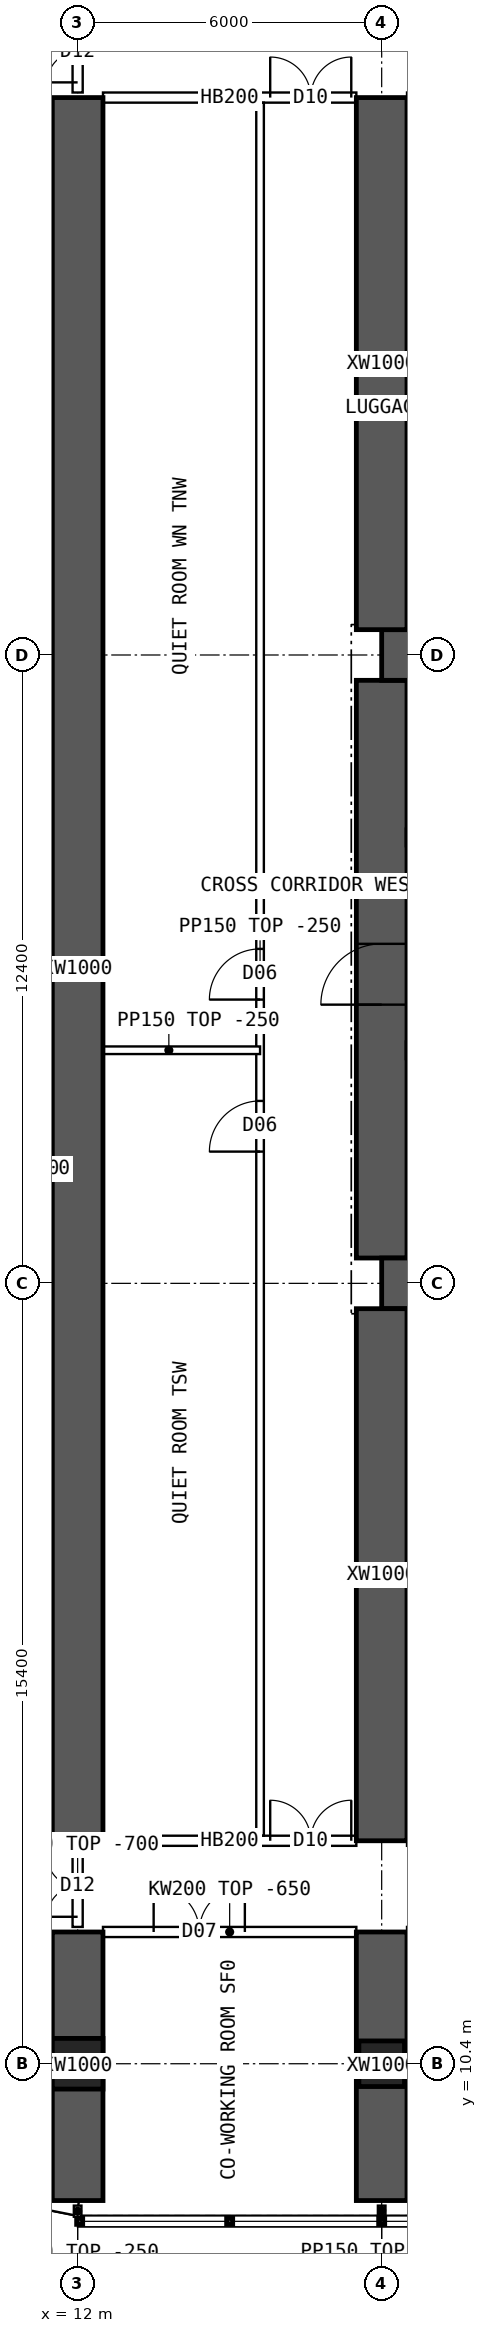
"""IFC4 building model, lengths in metres.
Left out: names, types, materials, properties, quantities, classifications, styles, units other than length and angle.
Written with IfcOpenShell. Run it as: python <this file> out.ifc"""

import sys

from ifc_helpers import new_model, si_unit, direction, frame, frame_2d, origin, origin_2d, place, context, subcontext, project, spatial, polyline, rectangle, hollow_rectangle, outline, extrude, element, fill, save


model = new_model("IFC4")
c1 = context("Model", 3, precision=1e-05, world=origin(), true_north=direction((0.0, 1.0)))
c2 = subcontext(c1, "Body", "Model", "MODEL_VIEW")
j1 = project(units=[si_unit("LENGTHUNIT", "METRE"), si_unit("PLANEANGLEUNIT", "RADIAN")], contexts=[c1])
p1 = place(None, origin())
s1 = spatial("IfcSite", under=j1, at=p1, CompositionType="ELEMENT")
p2 = place(p1, origin())
s2 = spatial("IfcBuilding", under=s1, at=p2, CompositionType="ELEMENT")
p3 = place(p2, frame((0.0, 0.0, 16.0)))
s3 = spatial("IfcBuildingStorey", under=s2, at=p3, CompositionType="ELEMENT", Elevation=16.0)
p4 = place(p3, frame((12.0, 10.4, 0.0), z_axis=(0.0, 0.0, 1.0), x_axis=(1.0, 0.0, 0.0)))
e1 = element("IfcColumn", 1, at=p4, inside=s3, PredefinedType="COLUMN", context=c2, shape_type="SweptSolid", body=[
    extrude(hollow_rectangle(XDim=1.0, YDim=1.0, WallThickness=0.1, at=origin_2d()), origin(), (0.0, 0.0, 1.0), 4.2),
])
p5 = place(p3, frame((18.0, 10.4, 0.0), z_axis=(0.0, 0.0, 1.0), x_axis=(1.0, 0.0, 0.0)))
e2 = element("IfcColumn", 2, at=p5, inside=s3, PredefinedType="COLUMN", context=c2, shape_type="SweptSolid", body=[
    extrude(hollow_rectangle(XDim=0.9, YDim=0.9, WallThickness=0.09, at=origin_2d()), origin(), (0.0, 0.0, 1.0), 4.2),
])
for number, where, z_axis, x_axis in (
    (3, (18.0, 25.8, 0.0), (0.0, 0.0, 1.0), (1.0, 0.0, 0.0)),
    (4, (18.0, 38.2, 0.0), (0.0, 0.0, 1.0), (1.0, 0.0, 0.0)),
):
    element("IfcWall", number, at=place(p3, frame(where, z_axis=z_axis, x_axis=x_axis)), inside=s3, PredefinedType="SHEAR", context=c2, shape_type="SweptSolid", body=[
        extrude(rectangle(XDim=48.0, YDim=1.0, at=frame_2d((24.0, 0.0))), origin(), (0.0, 0.0, 1.0), 4.2),
    ])
p6 = place(p3, frame((18.0, 26.3, 0.0), z_axis=(0.0, 0.0, 1.0), x_axis=(0.0, 1.0, 0.0)))
e5 = element("IfcWall", 5, at=p6, inside=s3, PredefinedType="SHEAR", context=c2, shape_type="SweptSolid", body=[
    extrude(rectangle(XDim=11.4, YDim=1.0, at=frame_2d((5.7, 0.0))), origin(), (0.0, 0.0, 1.0), 4.2),
])
p7 = place(p6, frame((5.0, 0.0, 0.0)))
e6 = element("IfcOpeningElement", 6, at=p7, cuts=e5, PredefinedType="OPENING", context=c2, shape_type="SweptSolid", body=[
    extrude(rectangle(XDim=1.2, YDim=2.1, at=frame_2d((0.6, 1.05))), frame((0.0, 0.51, 0.0), z_axis=(0.0, -1.0, 0.0), x_axis=(1.0, 0.0, 0.0)), (0.0, 0.0, 1.0), 1.02),
])
p8 = place(p3, frame((12.0, 7.7, 0.0), z_axis=(0.0, 0.0, 1.0), x_axis=(0.0, 1.0, 0.0)))
e7 = element("IfcWall", 7, at=p8, inside=s3, PredefinedType="SHEAR", context=c2, shape_type="SweptSolid", body=[
    extrude(rectangle(XDim=5.3, YDim=1.0, at=frame_2d((2.65, 0.0))), origin(), (0.0, 0.0, 1.0), 4.2),
])
p9 = place(p3, frame((12.0, 14.8, 0.0), z_axis=(0.0, 0.0, 1.0), x_axis=(0.0, 1.0, 0.0)))
e8 = element("IfcWall", 8, at=p9, inside=s3, PredefinedType="SHEAR", context=c2, shape_type="SweptSolid", body=[
    extrude(rectangle(XDim=34.4, YDim=1.0, at=frame_2d((17.2, 0.0))), origin(), (0.0, 0.0, 1.0), 4.2),
])
p10 = place(p3, frame((18.0, 7.7, 0.0), z_axis=(0.0, 0.0, 1.0), x_axis=(0.0, 1.0, 0.0)))
e9 = element("IfcWall", 9, at=p10, inside=s3, PredefinedType="SHEAR", context=c2, shape_type="SweptSolid", body=[
    extrude(rectangle(XDim=5.3, YDim=1.0, at=frame_2d((2.65, 0.0))), origin(), (0.0, 0.0, 1.0), 4.2),
])
for number, where, z_axis, x_axis in (
    (10, (18.0, 14.8, 0.0), (0.0, 0.0, 1.0), (0.0, 1.0, 0.0)),
    (11, (18.0, 38.7, 0.0), (0.0, 0.0, 1.0), (0.0, 1.0, 0.0)),
):
    element("IfcWall", number, at=place(p3, frame(where, z_axis=z_axis, x_axis=x_axis)), inside=s3, PredefinedType="SHEAR", context=c2, shape_type="SweptSolid", body=[
        extrude(rectangle(XDim=10.5, YDim=1.0, at=frame_2d((5.25, 0.0))), origin(), (0.0, 0.0, 1.0), 4.2),
    ])
p11 = place(p3, frame((8.843, 8.178, 0.0), z_axis=(0.0, 0.0, 1.0), x_axis=(0.980787251524, -0.195080412259, 0.0)))
e12 = element("IfcWall", 12, at=p11, inside=s3, PredefinedType="SOLIDWALL", context=c2, shape_type="SweptSolid", body=[
    extrude(outline(polyline([(-0.03, -0.15), (3.249, -0.15), (3.189, 0.15), (0.03, 0.15), (-0.03, -0.15)])), origin(), (0.0, 0.0, 1.0), 3.95),
])
p12 = place(p11, frame((0.909, 0.0, 0.9)))
e13 = element("IfcOpeningElement", 13, at=p12, cuts=e12, PredefinedType="OPENING", context=c2, shape_type="SweptSolid", body=[
    extrude(rectangle(XDim=1.4, YDim=1.8, at=frame_2d((0.7, 0.9))), frame((0.0, 0.16, 0.0), z_axis=(0.0, -1.0, 0.0), x_axis=(1.0, 0.0, 0.0)), (0.0, 0.0, 1.0), 0.32),
])
p13 = place(p3, frame((12.5, 13.0, 0.0), z_axis=(0.0, 0.0, 1.0), x_axis=(1.0, 0.0, 0.0)))
e14 = element("IfcWall", 14, at=p13, inside=s3, PredefinedType="SOLIDWALL", context=c2, shape_type="SweptSolid", body=[
    extrude(outline(polyline([(0.0, 0.0), (5.0, 0.0), (5.0, 3.55), (0.0, 3.55), (0.0, 0.0)])), frame((0.0, 0.1, 0.0), z_axis=(0.0, -1.0, 0.0), x_axis=(1.0, 0.0, 0.0)), (0.0, 0.0, 1.0), 0.2),
])
p14 = place(p13, frame((1.0, 0.0, 0.0)))
e15 = element("IfcOpeningElement", 15, at=p14, cuts=e14, PredefinedType="OPENING", context=c2, shape_type="SweptSolid", body=[
    extrude(rectangle(XDim=1.8, YDim=2.1, at=frame_2d((0.9, 1.05))), frame((0.0, 0.11, 0.0), z_axis=(0.0, -1.0, 0.0), x_axis=(1.0, 0.0, 0.0)), (0.0, 0.0, 1.0), 0.22),
])
p15 = place(p3, frame((12.5, 14.8, 0.0), z_axis=(0.0, 0.0, 1.0), x_axis=(1.0, 0.0, 0.0)))
e16 = element("IfcWall", 16, at=p15, inside=s3, PredefinedType="SOLIDWALL", context=c2, shape_type="SweptSolid", body=[
    extrude(rectangle(XDim=5.0, YDim=0.2, at=frame_2d((2.5, 0.0))), origin(), (0.0, 0.0, 1.0), 3.95),
])
p16 = place(p15, frame((3.3, 0.0, 0.0)))
e17 = element("IfcOpeningElement", 17, at=p16, cuts=e16, PredefinedType="OPENING", context=c2, shape_type="SweptSolid", body=[
    extrude(rectangle(XDim=1.6, YDim=2.1, at=frame_2d((0.8, 1.05))), frame((0.0, 0.11, 0.0), z_axis=(0.0, -1.0, 0.0), x_axis=(1.0, 0.0, 0.0)), (0.0, 0.0, 1.0), 0.22),
])
p17 = place(p3, frame((12.5, 49.2, 0.0), z_axis=(0.0, 0.0, 1.0), x_axis=(1.0, 0.0, 0.0)))
e18 = element("IfcWall", 18, at=p17, inside=s3, PredefinedType="SOLIDWALL", context=c2, shape_type="SweptSolid", body=[
    extrude(rectangle(XDim=5.0, YDim=0.2, at=frame_2d((2.5, 0.0))), origin(), (0.0, 0.0, 1.0), 3.95),
])
p18 = place(p17, frame((3.3, 0.0, 0.0)))
e19 = element("IfcOpeningElement", 19, at=p18, cuts=e18, PredefinedType="OPENING", context=c2, shape_type="SweptSolid", body=[
    extrude(rectangle(XDim=1.6, YDim=2.1, at=frame_2d((0.8, 1.05))), frame((0.0, 0.11, 0.0), z_axis=(0.0, -1.0, 0.0), x_axis=(1.0, 0.0, 0.0)), (0.0, 0.0, 1.0), 0.22),
])
p19 = place(p3, frame((15.6, 14.9, 0.0), z_axis=(0.0, 0.0, 1.0), x_axis=(0.0, 1.0, 0.0)))
e20 = element("IfcWall", 20, at=p19, inside=s3, PredefinedType="PARTITIONING", context=c2, shape_type="SweptSolid", body=[
    extrude(rectangle(XDim=34.2, YDim=0.15, at=frame_2d((17.1, 0.0))), origin(), (0.0, 0.0, 1.0), 3.95),
])
p20 = place(p19, frame((13.5, 0.0, 0.0)))
e21 = element("IfcOpeningElement", 21, at=p20, cuts=e20, PredefinedType="OPENING", context=c2, shape_type="SweptSolid", body=[
    extrude(rectangle(XDim=1.0, YDim=2.1, at=frame_2d((0.5, 1.05))), frame((0.0, 0.085, 0.0), z_axis=(0.0, -1.0, 0.0), x_axis=(1.0, 0.0, 0.0)), (0.0, 0.0, 1.0), 0.17),
])
p21 = place(p19, frame((16.5, 0.0, 0.0)))
e22 = element("IfcOpeningElement", 22, at=p21, cuts=e20, PredefinedType="OPENING", context=c2, shape_type="SweptSolid", body=[
    extrude(rectangle(XDim=1.0, YDim=2.1, at=frame_2d((0.5, 1.05))), frame((0.0, 0.085, 0.0), z_axis=(0.0, -1.0, 0.0), x_axis=(1.0, 0.0, 0.0)), (0.0, 0.0, 1.0), 0.17),
])
p22 = place(p3, frame((12.0, 30.4, 0.0), z_axis=(0.0, 0.0, 1.0), x_axis=(1.0, 0.0, 0.0)))
e23 = element("IfcWall", 23, at=p22, inside=s3, PredefinedType="PARTITIONING", context=c2, shape_type="SweptSolid", body=[
    extrude(rectangle(XDim=3.6, YDim=0.15, at=frame_2d((1.8, 0.0))), origin(), (0.0, 0.0, 1.0), 3.95),
])
p23 = place(p3, frame((3.905, 30.85, 0.0), z_axis=(0.0, 0.0, 1.0), x_axis=(1.0, 0.0, 0.0)))
e24 = element("IfcWall", 24, at=p23, inside=s3, PredefinedType="PARTITIONING", context=c2, shape_type="SweptSolid", body=[
    extrude(outline(polyline([(0.0, 0.0), (8.02, 0.0), (8.02, 3.95), (2.397, 3.95), (2.395, 3.5), (1.797, 3.5), (1.795, 3.95), (0.0, 3.95), (0.0, 0.0)])), frame((0.0, 0.075, 0.0), z_axis=(0.0, -1.0, 0.0), x_axis=(1.0, 0.0, 0.0)), (0.0, 0.0, 1.0), 0.15),
])
p24 = place(p3, frame((12.0, 13.1, 0.0), z_axis=(0.0, 0.0, 1.0), x_axis=(0.0, 1.0, 0.0)))
e25 = element("IfcWall", 25, at=p24, inside=s3, PredefinedType="SOLIDWALL", context=c2, shape_type="SweptSolid", body=[
    extrude(outline(polyline([(0.0, 0.0), (1.6, 0.0), (1.6, 3.5), (0.0, 3.5), (0.0, 0.0)])), frame((0.0, 0.1, 0.0), z_axis=(0.0, -1.0, 0.0), x_axis=(1.0, 0.0, 0.0)), (0.0, 0.0, 1.0), 0.2),
])
p25 = place(p24, frame((0.2, 0.0, 0.0)))
e26 = element("IfcOpeningElement", 26, at=p25, cuts=e25, PredefinedType="OPENING", context=c2, shape_type="SweptSolid", body=[
    extrude(rectangle(XDim=1.2, YDim=2.1, at=frame_2d((0.6, 1.05))), frame((0.0, 0.11, 0.0), z_axis=(0.0, -1.0, 0.0), x_axis=(1.0, 0.0, 0.0)), (0.0, 0.0, 1.0), 0.22),
])
p26 = place(p3, frame((12.0, 49.3, 0.0), z_axis=(0.0, 0.0, 1.0), x_axis=(0.0, 1.0, 0.0)))
e27 = element("IfcWall", 27, at=p26, inside=s3, PredefinedType="SOLIDWALL", context=c2, shape_type="SweptSolid", body=[
    extrude(outline(polyline([(0.0, 0.0), (1.6, 0.0), (1.6, 3.5), (0.0, 3.5), (0.0, 0.0)])), frame((0.0, 0.1, 0.0), z_axis=(0.0, -1.0, 0.0), x_axis=(1.0, 0.0, 0.0)), (0.0, 0.0, 1.0), 0.2),
])
p27 = place(p26, frame((0.2, 0.0, 0.0)))
e28 = element("IfcOpeningElement", 28, at=p27, cuts=e27, PredefinedType="OPENING", context=c2, shape_type="SweptSolid", body=[
    extrude(rectangle(XDim=1.2, YDim=2.1, at=frame_2d((0.6, 1.05))), frame((0.0, 0.11, 0.0), z_axis=(0.0, -1.0, 0.0), x_axis=(1.0, 0.0, 0.0)), (0.0, 0.0, 1.0), 0.22),
])
p28 = place(p3, frame((12.0, 7.6, 0.0), z_axis=(0.0, 0.0, 1.0), x_axis=(0.0, -1.0, 0.0)))
e29 = element("IfcWall", 29, at=p28, inside=s3, PredefinedType="PARTITIONING", context=c2, shape_type="SweptSolid", body=[
    extrude(rectangle(XDim=0.22, YDim=0.15, at=frame_2d((0.11, 0.0))), origin(), (0.0, 0.0, 1.0), 3.95),
])
p29 = place(p3, frame((18.0, 7.6, 0.0), z_axis=(0.0, 0.0, 1.0), x_axis=(0.0, -1.0, 0.0)))
e30 = element("IfcWall", 30, at=p29, inside=s3, PredefinedType="PARTITIONING", context=c2, shape_type="SweptSolid", body=[
    extrude(rectangle(XDim=0.19, YDim=0.15, at=frame_2d((0.095, 0.0))), origin(), (0.0, 0.0, 1.0), 3.95),
])
p30 = place(p7, origin())
e31 = element("IfcDoor", 31, at=p30, inside=s3, OperationType="SINGLE_SWING_LEFT", PredefinedType="DOOR", context=c2, shape_type="SweptSolid", body=[
    extrude(rectangle(XDim=1.2, YDim=2.1, at=frame_2d((0.6, 1.05))), frame((0.0, 0.025, 0.0), z_axis=(0.0, -1.0, 0.0), x_axis=(1.0, 0.0, 0.0)), (0.0, 0.0, 1.0), 0.05),
])
fill(e6, e31)
p31 = place(p16, origin())
e32 = element("IfcDoor", 32, at=p31, inside=s3, OperationType="DOUBLE_DOOR_SINGLE_SWING", PredefinedType="DOOR", context=c2, shape_type="SweptSolid", body=[
    extrude(rectangle(XDim=1.6, YDim=2.1, at=frame_2d((0.8, 1.05))), frame((0.0, 0.025, 0.0), z_axis=(0.0, -1.0, 0.0), x_axis=(1.0, 0.0, 0.0)), (0.0, 0.0, 1.0), 0.05),
])
fill(e17, e32)
p32 = place(p18, origin())
e33 = element("IfcDoor", 33, at=p32, inside=s3, OperationType="DOUBLE_DOOR_SINGLE_SWING", PredefinedType="DOOR", context=c2, shape_type="SweptSolid", body=[
    extrude(rectangle(XDim=1.6, YDim=2.1, at=frame_2d((0.8, 1.05))), frame((0.0, 0.025, 0.0), z_axis=(0.0, -1.0, 0.0), x_axis=(1.0, 0.0, 0.0)), (0.0, 0.0, 1.0), 0.05),
])
fill(e19, e33)
p33 = place(p14, origin())
e34 = element("IfcDoor", 34, at=p33, inside=s3, OperationType="DOUBLE_DOOR_SINGLE_SWING", PredefinedType="DOOR", context=c2, shape_type="SweptSolid", body=[
    extrude(rectangle(XDim=1.8, YDim=2.1, at=frame_2d((0.9, 1.05))), frame((0.0, 0.025, 0.0), z_axis=(0.0, -1.0, 0.0), x_axis=(1.0, 0.0, 0.0)), (0.0, 0.0, 1.0), 0.05),
])
fill(e15, e34)
p34 = place(p20, origin())
e35 = element("IfcDoor", 35, at=p34, inside=s3, OperationType="SINGLE_SWING_LEFT", PredefinedType="DOOR", context=c2, shape_type="SweptSolid", body=[
    extrude(rectangle(XDim=1.0, YDim=2.1, at=frame_2d((0.5, 1.05))), frame((0.0, 0.025, 0.0), z_axis=(0.0, -1.0, 0.0), x_axis=(1.0, 0.0, 0.0)), (0.0, 0.0, 1.0), 0.05),
])
fill(e21, e35)
p35 = place(p21, origin())
e36 = element("IfcDoor", 36, at=p35, inside=s3, OperationType="SINGLE_SWING_LEFT", PredefinedType="DOOR", context=c2, shape_type="SweptSolid", body=[
    extrude(rectangle(XDim=1.0, YDim=2.1, at=frame_2d((0.5, 1.05))), frame((0.0, 0.025, 0.0), z_axis=(0.0, -1.0, 0.0), x_axis=(1.0, 0.0, 0.0)), (0.0, 0.0, 1.0), 0.05),
])
fill(e22, e36)
p36 = place(p25, origin())
e37 = element("IfcDoor", 37, at=p36, inside=s3, OperationType="DOUBLE_DOOR_SINGLE_SWING", PredefinedType="DOOR", context=c2, shape_type="SweptSolid", body=[
    extrude(rectangle(XDim=1.2, YDim=2.1, at=frame_2d((0.6, 1.05))), frame((0.0, 0.025, 0.0), z_axis=(0.0, -1.0, 0.0), x_axis=(1.0, 0.0, 0.0)), (0.0, 0.0, 1.0), 0.05),
])
fill(e26, e37)
p37 = place(p27, origin())
e38 = element("IfcDoor", 38, at=p37, inside=s3, OperationType="DOUBLE_DOOR_SINGLE_SWING", PredefinedType="DOOR", context=c2, shape_type="SweptSolid", body=[
    extrude(rectangle(XDim=1.2, YDim=2.1, at=frame_2d((0.6, 1.05))), frame((0.0, 0.025, 0.0), z_axis=(0.0, -1.0, 0.0), x_axis=(1.0, 0.0, 0.0)), (0.0, 0.0, 1.0), 0.05),
])
fill(e28, e38)
save(model, sys.argv[1])
